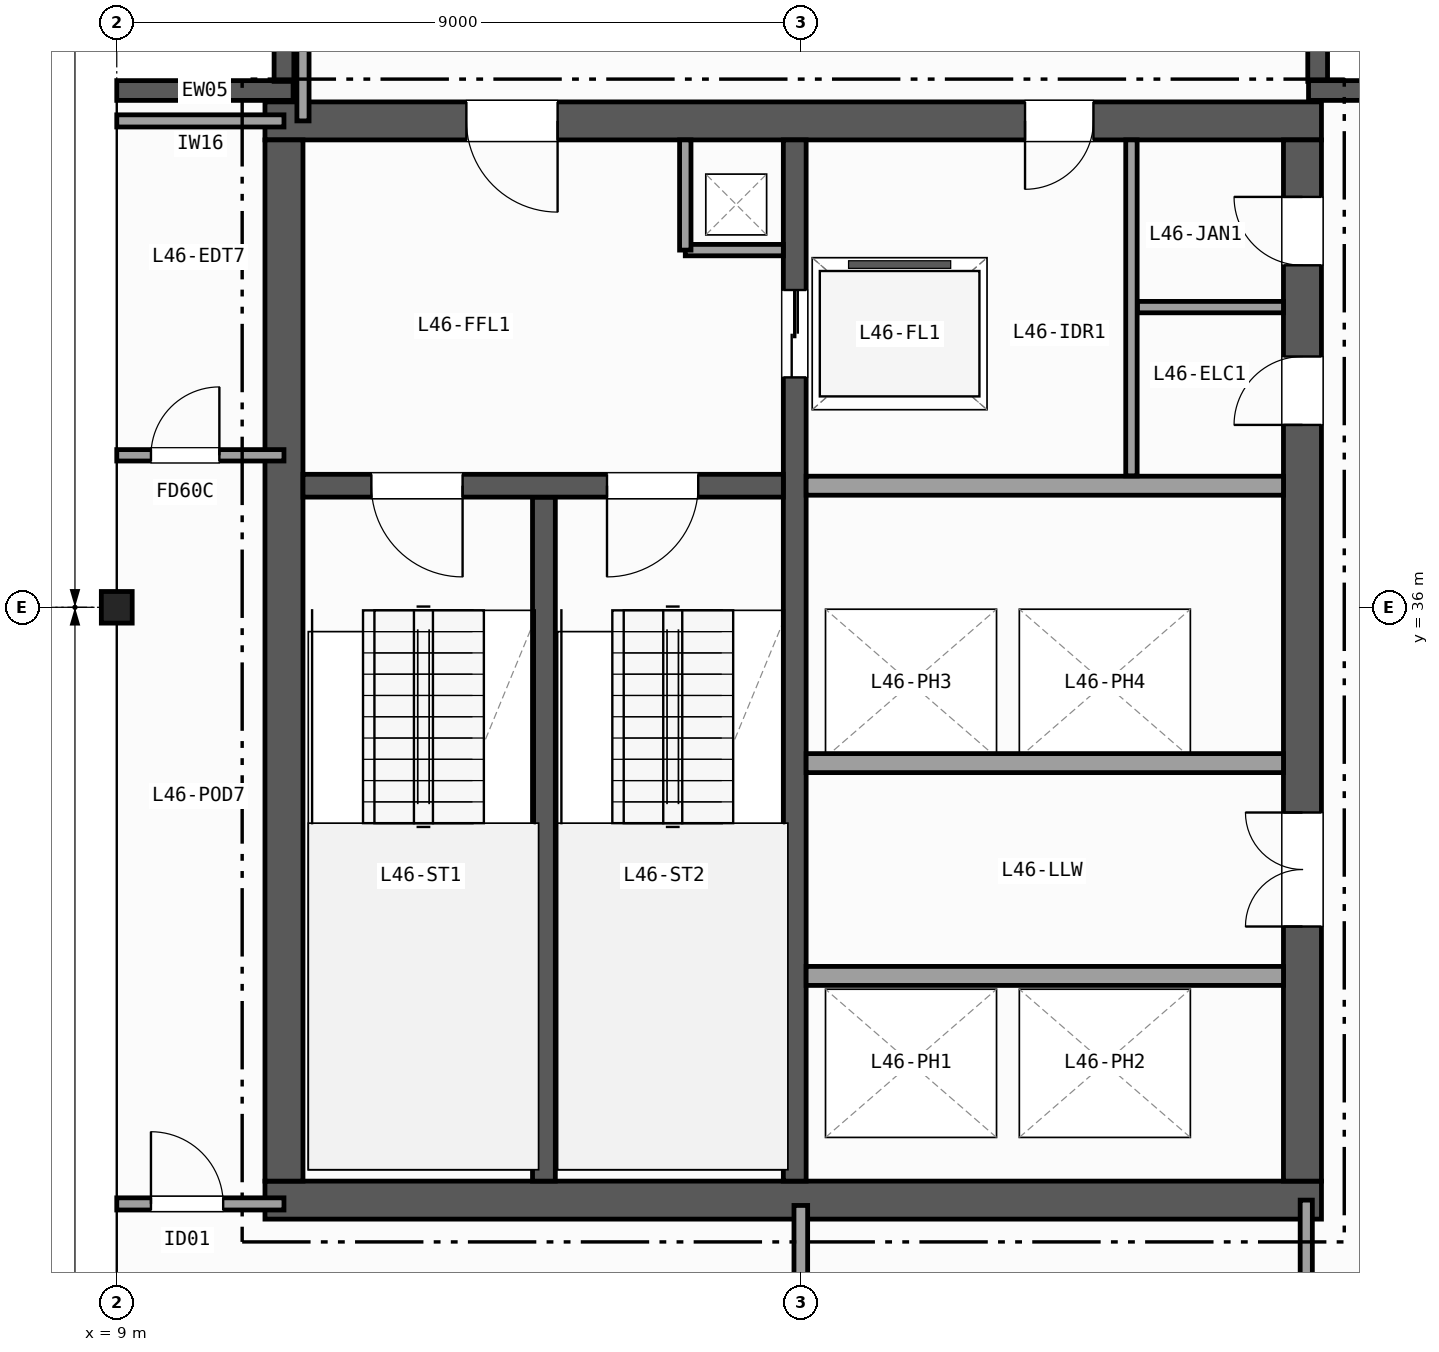
"""IFC4 building model, lengths in metres.
Left out: names, types, materials, properties, quantities, classifications, styles, units other than length and angle.
Written with IfcOpenShell. Run it as: python <this file> out.ifc"""

import sys

from ifc_helpers import new_model, si_unit, direction, frame, frame_2d, origin, origin_2d, place, context, subcontext, project, spatial, rectangle, i_section, extrude, element, fill, save


model = new_model("IFC4")
c1 = context("Model", 3, precision=1e-05, world=origin(), true_north=direction((0.0, 1.0)))
c2 = subcontext(c1, "Body", "Model", "MODEL_VIEW")
j1 = project(units=[si_unit("LENGTHUNIT", "METRE"), si_unit("PLANEANGLEUNIT", "RADIAN")], contexts=[c1])
p1 = place(None, origin())
s1 = spatial("IfcSite", under=j1, at=p1, CompositionType="ELEMENT")
p2 = place(p1, origin())
s2 = spatial("IfcBuilding", under=s1, at=p2, CompositionType="ELEMENT")
p3 = place(p2, frame((0.0, 0.0, 185.3)))
s3 = spatial("IfcBuildingStorey", under=s2, at=p3, CompositionType="ELEMENT", Elevation=185.3)
p4 = place(p3, frame((9.0, 36.0, 0.0), z_axis=(0.0, 0.0, 1.0), x_axis=(1.0, 0.0, 0.0)))
e1 = element("IfcColumn", 1, at=p4, inside=s3, PredefinedType="COLUMN", context=c2, shape_type="SweptSolid", body=[
    extrude(i_section(OverallWidth=0.406, OverallDepth=0.416, WebThickness=0.03, FlangeThickness=0.048, FilletRadius=0.015, at=origin_2d()), origin(), (0.0, 0.0, 1.0), 3.7),
])
p5 = place(p3, frame((9.0, 42.8, 0.0), z_axis=(0.0, 0.0, 1.0), x_axis=(1.0, 0.0, 0.0)))
e2 = element("IfcWall", 2, at=p5, inside=s3, PredefinedType="SOLIDWALL", context=c2, shape_type="SweptSolid", body=[
    extrude(rectangle(XDim=2.32, YDim=0.26, at=frame_2d((1.16, 0.0))), origin(), (0.0, 0.0, 1.0), 3.42),
])
for number, where, z_axis, x_axis in (
    (3, (11.2, 42.92, 0.0), (0.0, 0.0, 1.0), (0.0, 1.0, 0.0)),
    (4, (24.8, 45.0, 0.0), (0.0, 0.0, 1.0), (0.0, -1.0, 0.0)),
):
    element("IfcWall", number, at=place(p3, frame(where, z_axis=z_axis, x_axis=x_axis)), inside=s3, PredefinedType="SOLIDWALL", context=c2, shape_type="SweptSolid", body=[
        extrude(rectangle(XDim=2.08, YDim=0.26, at=frame_2d((1.04, 0.0))), origin(), (0.0, 0.0, 1.0), 3.42),
    ])
p6 = place(p3, frame((24.68, 42.8, 0.0), z_axis=(0.0, 0.0, 1.0), x_axis=(1.0, 0.0, 0.0)))
e5 = element("IfcWall", 5, at=p6, inside=s3, PredefinedType="SOLIDWALL", context=c2, shape_type="SweptSolid", body=[
    extrude(rectangle(XDim=2.32, YDim=0.26, at=frame_2d((1.16, 0.0))), origin(), (0.0, 0.0, 1.0), 3.42),
])
p7 = place(p3, frame((10.95, 28.2, 0.0), z_axis=(0.0, 0.0, 1.0), x_axis=(1.0, 0.0, 0.0)))
e6 = element("IfcWall", 6, at=p7, inside=s3, PredefinedType="SHEAR", context=c2, shape_type="SweptSolid", body=[
    extrude(rectangle(XDim=13.9, YDim=0.5, at=frame_2d((6.95, 0.0))), origin(), (0.0, 0.0, 1.0), 3.42),
])
p8 = place(p3, frame((24.85, 42.4, 0.0), z_axis=(0.0, 0.0, 1.0), x_axis=(-1.0, 0.0, 0.0)))
e7 = element("IfcWall", 7, at=p8, inside=s3, PredefinedType="SHEAR", context=c2, shape_type="SweptSolid", body=[
    extrude(rectangle(XDim=13.9, YDim=0.5, at=frame_2d((6.95, 0.0))), origin(), (0.0, 0.0, 1.0), 3.42),
])
p9 = place(p8, frame((10.05, 0.0, 0.0)))
e8 = element("IfcOpeningElement", 8, at=p9, cuts=e7, PredefinedType="OPENING", context=c2, shape_type="SweptSolid", body=[
    extrude(rectangle(XDim=1.2, YDim=2.15, at=frame_2d((0.6, 1.075))), frame((0.0, 0.26, 0.0), z_axis=(0.0, -1.0, 0.0), x_axis=(1.0, 0.0, 0.0)), (0.0, 0.0, 1.0), 0.52),
])
p10 = place(p8, frame((3.0, 0.0, 0.0)))
e9 = element("IfcOpeningElement", 9, at=p10, cuts=e7, PredefinedType="OPENING", context=c2, shape_type="SweptSolid", body=[
    extrude(rectangle(XDim=0.9, YDim=2.1, at=frame_2d((0.45, 1.05))), frame((0.0, 0.26, 0.0), z_axis=(0.0, -1.0, 0.0), x_axis=(1.0, 0.0, 0.0)), (0.0, 0.0, 1.0), 0.52),
])
p11 = place(p3, frame((11.2, 42.15, 0.0), z_axis=(0.0, 0.0, 1.0), x_axis=(0.0, -1.0, 0.0)))
e10 = element("IfcWall", 10, at=p11, inside=s3, PredefinedType="SHEAR", context=c2, shape_type="SweptSolid", body=[
    extrude(rectangle(XDim=13.7, YDim=0.5, at=frame_2d((6.85, 0.0))), origin(), (0.0, 0.0, 1.0), 3.42),
])
p12 = place(p3, frame((24.6, 28.45, 0.0), z_axis=(0.0, 0.0, 1.0), x_axis=(0.0, 1.0, 0.0)))
e11 = element("IfcWall", 11, at=p12, inside=s3, PredefinedType="SHEAR", context=c2, shape_type="SweptSolid", body=[
    extrude(rectangle(XDim=13.7, YDim=0.5, at=frame_2d((6.85, 0.0))), origin(), (0.0, 0.0, 1.0), 3.42),
])
p13 = place(p12, frame((3.35, 0.0, 0.0)))
e12 = element("IfcOpeningElement", 12, at=p13, cuts=e11, PredefinedType="OPENING", context=c2, shape_type="SweptSolid", body=[
    extrude(rectangle(XDim=1.5, YDim=2.2, at=frame_2d((0.75, 1.1))), frame((0.0, 0.26, 0.0), z_axis=(0.0, -1.0, 0.0), x_axis=(1.0, 0.0, 0.0)), (0.0, 0.0, 1.0), 0.52),
])
p14 = place(p12, frame((9.95, 0.0, 0.0)))
e13 = element("IfcOpeningElement", 13, at=p14, cuts=e11, PredefinedType="OPENING", context=c2, shape_type="SweptSolid", body=[
    extrude(rectangle(XDim=0.9, YDim=2.1, at=frame_2d((0.45, 1.05))), frame((0.0, 0.26, 0.0), z_axis=(0.0, -1.0, 0.0), x_axis=(1.0, 0.0, 0.0)), (0.0, 0.0, 1.0), 0.52),
])
p15 = place(p12, frame((12.05, 0.0, 0.0)))
e14 = element("IfcOpeningElement", 14, at=p15, cuts=e11, PredefinedType="OPENING", context=c2, shape_type="SweptSolid", body=[
    extrude(rectangle(XDim=0.9, YDim=2.1, at=frame_2d((0.45, 1.05))), frame((0.0, 0.26, 0.0), z_axis=(0.0, -1.0, 0.0), x_axis=(1.0, 0.0, 0.0)), (0.0, 0.0, 1.0), 0.52),
])
p16 = place(p3, frame((14.62, 28.45, 0.0), z_axis=(0.0, 0.0, 1.0), x_axis=(0.0, 1.0, 0.0)))
e15 = element("IfcWall", 15, at=p16, inside=s3, PredefinedType="SHEAR", context=c2, shape_type="SweptSolid", body=[
    extrude(rectangle(XDim=9.0, YDim=0.3, at=frame_2d((4.5, 0.0))), origin(), (0.0, 0.0, 1.0), 3.42),
])
p17 = place(p3, frame((17.92, 42.15, 0.0), z_axis=(0.0, 0.0, 1.0), x_axis=(0.0, -1.0, 0.0)))
e16 = element("IfcWall", 16, at=p17, inside=s3, PredefinedType="SHEAR", context=c2, shape_type="SweptSolid", body=[
    extrude(rectangle(XDim=13.7, YDim=0.3, at=frame_2d((6.85, 0.0))), origin(), (0.0, 0.0, 1.0), 3.42),
])
p18 = place(p17, frame((1.975, 0.0, 0.0)))
e17 = element("IfcOpeningElement", 17, at=p18, cuts=e16, PredefinedType="OPENING", context=c2, shape_type="SweptSolid", body=[
    extrude(rectangle(XDim=1.15, YDim=2.15, at=frame_2d((0.575, 1.075))), frame((0.0, 0.16, 0.0), z_axis=(0.0, -1.0, 0.0), x_axis=(1.0, 0.0, 0.0)), (0.0, 0.0, 1.0), 0.32),
])
p19 = place(p3, frame((17.77, 37.6, 0.0), z_axis=(0.0, 0.0, 1.0), x_axis=(-1.0, 0.0, 0.0)))
e18 = element("IfcWall", 18, at=p19, inside=s3, PredefinedType="SHEAR", context=c2, shape_type="SweptSolid", body=[
    extrude(rectangle(XDim=6.32, YDim=0.3, at=frame_2d((3.16, 0.0))), origin(), (0.0, 0.0, 1.0), 3.42),
])
p20 = place(p19, frame((4.22, 0.0, 0.0)))
e19 = element("IfcOpeningElement", 19, at=p20, cuts=e18, PredefinedType="OPENING", context=c2, shape_type="SweptSolid", body=[
    extrude(rectangle(XDim=1.2, YDim=2.15, at=frame_2d((0.6, 1.075))), frame((0.0, 0.16, 0.0), z_axis=(0.0, -1.0, 0.0), x_axis=(1.0, 0.0, 0.0)), (0.0, 0.0, 1.0), 0.32),
])
p21 = place(p19, frame((1.12, 0.0, 0.0)))
e20 = element("IfcOpeningElement", 20, at=p21, cuts=e18, PredefinedType="OPENING", context=c2, shape_type="SweptSolid", body=[
    extrude(rectangle(XDim=1.2, YDim=2.15, at=frame_2d((0.6, 1.075))), frame((0.0, 0.16, 0.0), z_axis=(0.0, -1.0, 0.0), x_axis=(1.0, 0.0, 0.0)), (0.0, 0.0, 1.0), 0.32),
])
p22 = place(p3, frame((16.48, 40.7, 0.0), z_axis=(0.0, 0.0, 1.0), x_axis=(1.0, 0.0, 0.0)))
e21 = element("IfcWall", 21, at=p22, inside=s3, PredefinedType="PARTITIONING", context=c2, shape_type="SweptSolid", body=[
    extrude(rectangle(XDim=1.29, YDim=0.15, at=frame_2d((0.645, 0.0))), origin(), (0.0, 0.0, 1.0), 3.42),
])
p23 = place(p3, frame((16.48, 40.7, 0.0), z_axis=(0.0, 0.0, 1.0), x_axis=(0.0, 1.0, 0.0)))
e22 = element("IfcWall", 22, at=p23, inside=s3, PredefinedType="PARTITIONING", context=c2, shape_type="SweptSolid", body=[
    extrude(rectangle(XDim=1.45, YDim=0.15, at=frame_2d((0.725, 0.0))), origin(), (0.0, 0.0, 1.0), 3.42),
])
for number, where, z_axis, x_axis in (
    (23, (18.07, 37.6, 0.0), (0.0, 0.0, 1.0), (1.0, 0.0, 0.0)),
    (24, (18.07, 31.15, 0.0), (0.0, 0.0, 1.0), (1.0, 0.0, 0.0)),
    (25, (24.35, 33.95, 0.0), (0.0, 0.0, 1.0), (-1.0, 0.0, 0.0)),
):
    element("IfcWall", number, at=place(p3, frame(where, z_axis=z_axis, x_axis=x_axis)), inside=s3, PredefinedType="PARTITIONING", context=c2, shape_type="SweptSolid", body=[
        extrude(rectangle(XDim=6.28, YDim=0.25, at=frame_2d((3.14, 0.0))), origin(), (0.0, 0.0, 1.0), 3.42),
    ])
p24 = place(p3, frame((22.35, 37.73, 0.0), z_axis=(0.0, 0.0, 1.0), x_axis=(0.0, 1.0, 0.0)))
e26 = element("IfcWall", 26, at=p24, inside=s3, PredefinedType="PARTITIONING", context=c2, shape_type="SweptSolid", body=[
    extrude(rectangle(XDim=4.42, YDim=0.15, at=frame_2d((2.21, 0.0))), origin(), (0.0, 0.0, 1.0), 3.42),
])
p25 = place(p3, frame((22.43, 39.95, 0.0), z_axis=(0.0, 0.0, 1.0), x_axis=(1.0, 0.0, 0.0)))
e27 = element("IfcWall", 27, at=p25, inside=s3, PredefinedType="PARTITIONING", context=c2, shape_type="SweptSolid", body=[
    extrude(rectangle(XDim=1.92, YDim=0.15, at=frame_2d((0.96, 0.0))), origin(), (0.0, 0.0, 1.0), 3.42),
])
p26 = place(p3, frame((9.0, 28.15, 0.0), z_axis=(0.0, 0.0, 1.0), x_axis=(1.0, 0.0, 0.0)))
e28 = element("IfcWall", 28, at=p26, inside=s3, PredefinedType="PARTITIONING", context=c2, shape_type="SweptSolid", body=[
    extrude(rectangle(XDim=2.2, YDim=0.16, at=frame_2d((1.1, 0.0))), origin(), (0.0, 0.0, 1.0), 2.634),
])
p27 = place(p26, frame((0.45, 0.0, 0.0)))
e29 = element("IfcOpeningElement", 29, at=p27, cuts=e28, PredefinedType="OPENING", context=c2, shape_type="SweptSolid", body=[
    extrude(rectangle(XDim=0.95, YDim=2.1, at=frame_2d((0.475, 1.05))), frame((0.0, 0.09, 0.0), z_axis=(0.0, -1.0, 0.0), x_axis=(1.0, 0.0, 0.0)), (0.0, 0.0, 1.0), 0.18),
])
p28 = place(p3, frame((9.0, 42.4, 0.0), z_axis=(0.0, 0.0, 1.0), x_axis=(1.0, 0.0, 0.0)))
e30 = element("IfcWall", 30, at=p28, inside=s3, PredefinedType="PARTITIONING", context=c2, shape_type="SweptSolid", body=[
    extrude(rectangle(XDim=2.2, YDim=0.16, at=frame_2d((1.1, 0.0))), origin(), (0.0, 0.0, 1.0), 3.42),
])
p29 = place(p3, frame((11.45, 42.4, 0.0), z_axis=(0.0, 0.0, 1.0), x_axis=(0.0, 1.0, 0.0)))
e31 = element("IfcWall", 31, at=p29, inside=s3, PredefinedType="PARTITIONING", context=c2, shape_type="SweptSolid", body=[
    extrude(rectangle(XDim=2.666, YDim=0.16, at=frame_2d((1.333, 0.0))), origin(), (0.0, 0.0, 1.0), 3.42),
])
p30 = place(p3, frame((9.0, 38.0, 0.0), z_axis=(0.0, 0.0, 1.0), x_axis=(1.0, 0.0, 0.0)))
e32 = element("IfcWall", 32, at=p30, inside=s3, PredefinedType="PARTITIONING", context=c2, shape_type="SweptSolid", body=[
    extrude(rectangle(XDim=2.2, YDim=0.15, at=frame_2d((1.1, 0.0))), origin(), (0.0, 0.0, 1.0), 3.42),
])
p31 = place(p30, frame((0.45, 0.0, 0.0)))
e33 = element("IfcOpeningElement", 33, at=p31, cuts=e32, PredefinedType="OPENING", context=c2, shape_type="SweptSolid", body=[
    extrude(rectangle(XDim=0.9, YDim=2.1, at=frame_2d((0.45, 1.05))), frame((0.0, 0.085, 0.0), z_axis=(0.0, -1.0, 0.0), x_axis=(1.0, 0.0, 0.0)), (0.0, 0.0, 1.0), 0.17),
])
p32 = place(p3, frame((24.65, 9.0, 0.0), z_axis=(0.0, 0.0, 1.0), x_axis=(0.0, 1.0, 0.0)))
e34 = element("IfcWall", 34, at=p32, inside=s3, PredefinedType="PARTITIONING", context=c2, shape_type="SweptSolid", body=[
    extrude(rectangle(XDim=19.2, YDim=0.16, at=frame_2d((9.6, 0.0))), origin(), (0.0, 0.0, 1.0), 2.634),
])
p33 = place(p32, frame((2.8, 0.0, 0.0)))
e35 = element("IfcOpeningElement", 35, at=p33, cuts=e34, PredefinedType="OPENING", context=c2, shape_type="SweptSolid", body=[
    extrude(rectangle(XDim=1.05, YDim=2.15, at=frame_2d((0.525, 1.075))), frame((0.0, 0.09, 0.0), z_axis=(0.0, -1.0, 0.0), x_axis=(1.0, 0.0, 0.0)), (0.0, 0.0, 1.0), 0.18),
])
p34 = place(p32, frame((12.365, 0.0, 0.0)))
e36 = element("IfcOpeningElement", 36, at=p34, cuts=e34, PredefinedType="OPENING", context=c2, shape_type="SweptSolid", body=[
    extrude(rectangle(XDim=1.2, YDim=2.15, at=frame_2d((0.6, 1.075))), frame((0.0, 0.09, 0.0), z_axis=(0.0, -1.0, 0.0), x_axis=(1.0, 0.0, 0.0)), (0.0, 0.0, 1.0), 0.18),
])
p35 = place(p3, frame((18.0, 9.0, 0.0), z_axis=(0.0, 0.0, 1.0), x_axis=(0.0, 1.0, 0.0)))
e37 = element("IfcWall", 37, at=p35, inside=s3, PredefinedType="PARTITIONING", context=c2, shape_type="SweptSolid", body=[
    extrude(rectangle(XDim=19.13, YDim=0.18, at=frame_2d((9.565, 0.0))), origin(), (0.0, 0.0, 1.0), 2.634),
])
p36 = place(p35, frame((2.2, 0.0, 0.0)))
e38 = element("IfcOpeningElement", 38, at=p36, cuts=e37, PredefinedType="OPENING", context=c2, shape_type="SweptSolid", body=[
    extrude(rectangle(XDim=0.86, YDim=2.05, at=frame_2d((0.43, 1.025))), frame((0.0, 0.1, 0.0), z_axis=(0.0, -1.0, 0.0), x_axis=(1.0, 0.0, 0.0)), (0.0, 0.0, 1.0), 0.2),
])
p37 = place(p35, frame((13.5, 0.0, 0.0)))
e39 = element("IfcOpeningElement", 39, at=p37, cuts=e37, PredefinedType="OPENING", context=c2, shape_type="SweptSolid", body=[
    extrude(rectangle(XDim=0.95, YDim=2.1, at=frame_2d((0.475, 1.05))), frame((0.0, 0.1, 0.0), z_axis=(0.0, -1.0, 0.0), x_axis=(1.0, 0.0, 0.0)), (0.0, 0.0, 1.0), 0.2),
])
p38 = place(p20, origin())
e40 = element("IfcDoor", 40, at=p38, inside=s3, OperationType="SINGLE_SWING_LEFT", PredefinedType="DOOR", context=c2, shape_type="SweptSolid", body=[
    extrude(rectangle(XDim=1.2, YDim=2.15, at=frame_2d((0.6, 1.075))), frame((0.0, 0.025, 0.0), z_axis=(0.0, -1.0, 0.0), x_axis=(1.0, 0.0, 0.0)), (0.0, 0.0, 1.0), 0.05),
])
fill(e19, e40)
p39 = place(p21, origin())
e41 = element("IfcDoor", 41, at=p39, inside=s3, OperationType="SINGLE_SWING_RIGHT", PredefinedType="DOOR", context=c2, shape_type="SweptSolid", body=[
    extrude(rectangle(XDim=1.2, YDim=2.15, at=frame_2d((0.6, 1.075))), frame((0.0, 0.025, 0.0), z_axis=(0.0, -1.0, 0.0), x_axis=(1.0, 0.0, 0.0)), (0.0, 0.0, 1.0), 0.05),
])
fill(e20, e41)
p40 = place(p13, origin())
e42 = element("IfcDoor", 42, at=p40, inside=s3, OperationType="DOUBLE_DOOR_SINGLE_SWING", PredefinedType="DOOR", context=c2, shape_type="SweptSolid", body=[
    extrude(rectangle(XDim=1.5, YDim=2.2, at=frame_2d((0.75, 1.1))), frame((0.0, 0.025, 0.0), z_axis=(0.0, -1.0, 0.0), x_axis=(1.0, 0.0, 0.0)), (0.0, 0.0, 1.0), 0.05),
])
fill(e12, e42)
p41 = place(p9, origin())
e43 = element("IfcDoor", 43, at=p41, inside=s3, OperationType="SINGLE_SWING_LEFT", PredefinedType="DOOR", context=c2, shape_type="SweptSolid", body=[
    extrude(rectangle(XDim=1.2, YDim=2.15, at=frame_2d((0.6, 1.075))), frame((0.0, 0.025, 0.0), z_axis=(0.0, -1.0, 0.0), x_axis=(1.0, 0.0, 0.0)), (0.0, 0.0, 1.0), 0.05),
])
fill(e8, e43)
p42 = place(p14, origin())
e44 = element("IfcDoor", 44, at=p42, inside=s3, OperationType="SINGLE_SWING_LEFT", PredefinedType="DOOR", context=c2, shape_type="SweptSolid", body=[
    extrude(rectangle(XDim=0.9, YDim=2.1, at=frame_2d((0.45, 1.05))), frame((0.0, 0.025, 0.0), z_axis=(0.0, -1.0, 0.0), x_axis=(1.0, 0.0, 0.0)), (0.0, 0.0, 1.0), 0.05),
])
fill(e13, e44)
p43 = place(p10, origin())
e45 = element("IfcDoor", 45, at=p43, inside=s3, OperationType="SINGLE_SWING_RIGHT", PredefinedType="DOOR", context=c2, shape_type="SweptSolid", body=[
    extrude(rectangle(XDim=0.9, YDim=2.1, at=frame_2d((0.45, 1.05))), frame((0.0, 0.025, 0.0), z_axis=(0.0, -1.0, 0.0), x_axis=(1.0, 0.0, 0.0)), (0.0, 0.0, 1.0), 0.05),
])
fill(e9, e45)
p44 = place(p15, origin())
e46 = element("IfcDoor", 46, at=p44, inside=s3, OperationType="SINGLE_SWING_RIGHT", PredefinedType="DOOR", context=c2, shape_type="SweptSolid", body=[
    extrude(rectangle(XDim=0.9, YDim=2.1, at=frame_2d((0.45, 1.05))), frame((0.0, 0.025, 0.0), z_axis=(0.0, -1.0, 0.0), x_axis=(1.0, 0.0, 0.0)), (0.0, 0.0, 1.0), 0.05),
])
fill(e14, e46)
p45 = place(p18, origin())
e47 = element("IfcDoor", 47, at=p45, inside=s3, OperationType="DOUBLE_DOOR_SLIDING", PredefinedType="DOOR", context=c2, shape_type="SweptSolid", body=[
    extrude(rectangle(XDim=1.15, YDim=2.15, at=frame_2d((0.575, 1.075))), frame((0.0, 0.025, 0.0), z_axis=(0.0, -1.0, 0.0), x_axis=(1.0, 0.0, 0.0)), (0.0, 0.0, 1.0), 0.05),
])
fill(e17, e47)
p46 = place(p27, origin())
e48 = element("IfcDoor", 48, at=p46, inside=s3, OperationType="SINGLE_SWING_LEFT", PredefinedType="DOOR", context=c2, shape_type="SweptSolid", body=[
    extrude(rectangle(XDim=0.95, YDim=2.1, at=frame_2d((0.475, 1.05))), frame((0.0, 0.025, 0.0), z_axis=(0.0, -1.0, 0.0), x_axis=(1.0, 0.0, 0.0)), (0.0, 0.0, 1.0), 0.05),
])
fill(e29, e48)
p47 = place(p31, origin())
e49 = element("IfcDoor", 49, at=p47, inside=s3, OperationType="SINGLE_SWING_RIGHT", PredefinedType="DOOR", context=c2, shape_type="SweptSolid", body=[
    extrude(rectangle(XDim=0.9, YDim=2.1, at=frame_2d((0.45, 1.05))), frame((0.0, 0.025, 0.0), z_axis=(0.0, -1.0, 0.0), x_axis=(1.0, 0.0, 0.0)), (0.0, 0.0, 1.0), 0.05),
])
fill(e33, e49)
save(model, sys.argv[1])
